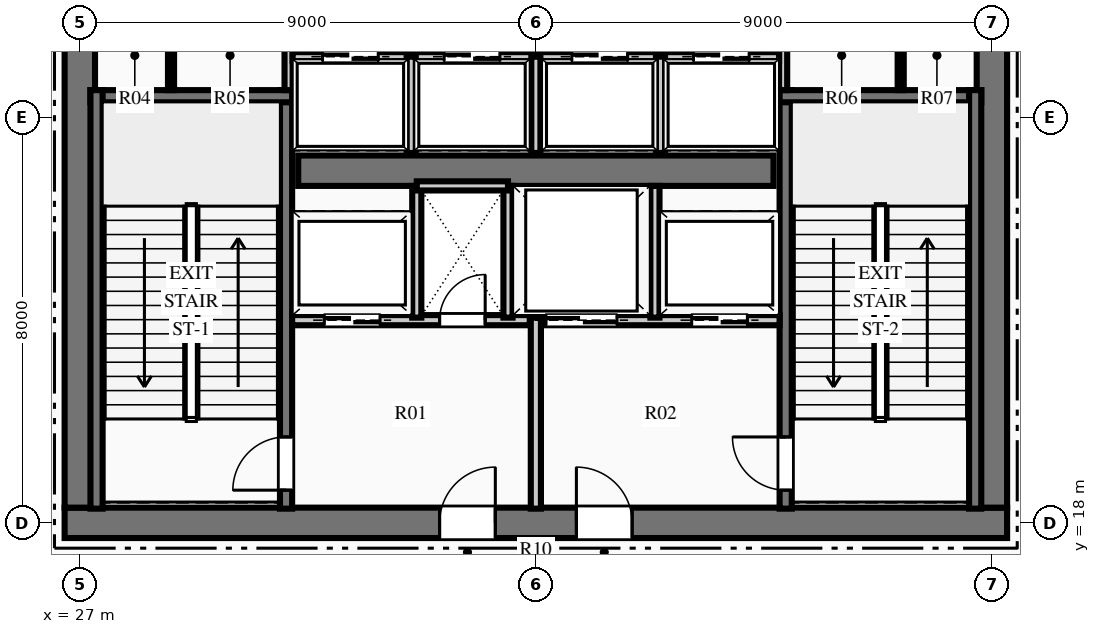
"""IFC4 building model, lengths in metres.
Left out: names, types, materials, properties, quantities, classifications, styles, units other than length and angle.
Written with IfcOpenShell. Run it as: python <this file> out.ifc"""

import sys

from ifc_helpers import new_model, si_unit, direction, frame, frame_2d, origin, place, context, subcontext, project, spatial, rectangle, extrude, element, fill, save


model = new_model("IFC4")
c1 = context("Model", 3, precision=1e-05, world=origin(), true_north=direction((0.0, 1.0)))
c2 = subcontext(c1, "Body", "Model", "MODEL_VIEW")
j1 = project(units=[si_unit("LENGTHUNIT", "METRE"), si_unit("PLANEANGLEUNIT", "RADIAN")], contexts=[c1])
p1 = place(None, origin())
s1 = spatial("IfcSite", under=j1, at=p1, CompositionType="ELEMENT")
p2 = place(p1, origin())
s2 = spatial("IfcBuilding", under=s1, at=p2, CompositionType="ELEMENT")
p3 = place(p2, frame((0.0, 0.0, 6.0)))
s3 = spatial("IfcBuildingStorey", under=s2, at=p3, CompositionType="ELEMENT", Elevation=6.0)
p4 = place(p3, frame((26.7, 18.0, 0.0), z_axis=(0.0, 0.0, 1.0), x_axis=(1.0, 0.0, 0.0)))
e1 = element("IfcWall", 1, at=p4, inside=s3, PredefinedType="SHEAR", context=c2, shape_type="SweptSolid", body=[
    extrude(rectangle(XDim=18.6, YDim=0.6, at=frame_2d((9.3, 0.0))), origin(), (0.0, 0.0, 1.0), 5.4),
])
p5 = place(p4, frame((7.4, 0.0, 0.0)))
e2 = element("IfcOpeningElement", 2, at=p5, cuts=e1, PredefinedType="OPENING", context=c2, shape_type="SweptSolid", body=[
    extrude(rectangle(XDim=1.1, YDim=2.15, at=frame_2d((0.55, 1.075))), frame((0.0, 0.31, 0.0), z_axis=(0.0, -1.0, 0.0), x_axis=(1.0, 0.0, 0.0)), (0.0, 0.0, 1.0), 0.62),
])
p6 = place(p4, frame((10.1, 0.0, 0.0)))
e3 = element("IfcOpeningElement", 3, at=p6, cuts=e1, PredefinedType="OPENING", context=c2, shape_type="SweptSolid", body=[
    extrude(rectangle(XDim=1.1, YDim=2.15, at=frame_2d((0.55, 1.075))), frame((0.0, 0.31, 0.0), z_axis=(0.0, -1.0, 0.0), x_axis=(1.0, 0.0, 0.0)), (0.0, 0.0, 1.0), 0.62),
])
p7 = place(p3, frame((27.0, 18.3, 0.0), z_axis=(0.0, 0.0, 1.0), x_axis=(0.0, 1.0, 0.0)))
e4 = element("IfcWall", 4, at=p7, inside=s3, PredefinedType="SHEAR", context=c2, shape_type="SweptSolid", body=[
    extrude(rectangle(XDim=15.4, YDim=0.6, at=frame_2d((7.7, 0.0))), origin(), (0.0, 0.0, 1.0), 5.4),
])
p8 = place(p7, frame((9.94, 0.0, 0.0)))
e5 = element("IfcOpeningElement", 5, at=p8, cuts=e4, PredefinedType="OPENING", context=c2, shape_type="SweptSolid", body=[
    extrude(rectangle(XDim=1.4, YDim=2.2, at=frame_2d((0.7, 1.1))), frame((0.0, 0.31, 0.0), z_axis=(0.0, -1.0, 0.0), x_axis=(1.0, 0.0, 0.0)), (0.0, 0.0, 1.0), 0.62),
])
p9 = place(p3, frame((45.0, 18.3, 0.0), z_axis=(0.0, 0.0, 1.0), x_axis=(0.0, 1.0, 0.0)))
e6 = element("IfcWall", 6, at=p9, inside=s3, PredefinedType="SHEAR", context=c2, shape_type="SweptSolid", body=[
    extrude(rectangle(XDim=15.4, YDim=0.6, at=frame_2d((7.7, 0.0))), origin(), (0.0, 0.0, 1.0), 5.4),
])
p10 = place(p9, frame((9.94, 0.0, 0.0)))
e7 = element("IfcOpeningElement", 7, at=p10, cuts=e6, PredefinedType="OPENING", context=c2, shape_type="SweptSolid", body=[
    extrude(rectangle(XDim=1.4, YDim=2.2, at=frame_2d((0.7, 1.1))), frame((0.0, 0.31, 0.0), z_axis=(0.0, -1.0, 0.0), x_axis=(1.0, 0.0, 0.0)), (0.0, 0.0, 1.0), 0.62),
])
p11 = place(p3, frame((31.31, 24.95, 0.0), z_axis=(0.0, 0.0, 1.0), x_axis=(1.0, 0.0, 0.0)))
e8 = element("IfcWall", 8, at=p11, inside=s3, PredefinedType="SHEAR", context=c2, shape_type="SweptSolid", body=[
    extrude(rectangle(XDim=9.38, YDim=0.6, at=frame_2d((4.69, 0.0))), origin(), (0.0, 0.0, 1.0), 5.4),
])
p12 = place(p3, frame((31.07, 18.28, 0.0), z_axis=(0.0, 0.0, 1.0), x_axis=(0.0, 1.0, 0.0)))
e9 = element("IfcWall", 9, at=p12, inside=s3, PredefinedType="SHEAR", context=c2, shape_type="SweptSolid", body=[
    extrude(rectangle(XDim=8.26, YDim=0.24, at=frame_2d((4.13, 0.0))), origin(), (0.0, 0.0, 1.0), 5.4),
])
p13 = place(p12, frame((0.365, 0.0, 0.0)))
e10 = element("IfcOpeningElement", 10, at=p13, cuts=e9, PredefinedType="OPENING", context=c2, shape_type="SweptSolid", body=[
    extrude(rectangle(XDim=1.05, YDim=2.15, at=frame_2d((0.525, 1.075))), frame((0.0, 0.13, 0.0), z_axis=(0.0, -1.0, 0.0), x_axis=(1.0, 0.0, 0.0)), (0.0, 0.0, 1.0), 0.26),
])
p14 = place(p3, frame((27.21, 26.42, 0.0), z_axis=(0.0, 0.0, 1.0), x_axis=(1.0, 0.0, 0.0)))
e11 = element("IfcWall", 11, at=p14, inside=s3, PredefinedType="SHEAR", context=c2, shape_type="SweptSolid", body=[
    extrude(rectangle(XDim=3.98, YDim=0.24, at=frame_2d((1.99, 0.0))), origin(), (0.0, 0.0, 1.0), 5.4),
])
p15 = place(p3, frame((27.33, 18.28, 0.0), z_axis=(0.0, 0.0, 1.0), x_axis=(0.0, 1.0, 0.0)))
e12 = element("IfcWall", 12, at=p15, inside=s3, PredefinedType="SHEAR", context=c2, shape_type="SweptSolid", body=[
    extrude(rectangle(XDim=8.26, YDim=0.24, at=frame_2d((4.13, 0.0))), origin(), (0.0, 0.0, 1.0), 5.4),
])
p16 = place(p3, frame((40.93, 18.28, 0.0), z_axis=(0.0, 0.0, 1.0), x_axis=(0.0, 1.0, 0.0)))
e13 = element("IfcWall", 13, at=p16, inside=s3, PredefinedType="SHEAR", context=c2, shape_type="SweptSolid", body=[
    extrude(rectangle(XDim=8.26, YDim=0.24, at=frame_2d((4.13, 0.0))), origin(), (0.0, 0.0, 1.0), 5.4),
])
p17 = place(p16, frame((0.365, 0.0, 0.0)))
e14 = element("IfcOpeningElement", 14, at=p17, cuts=e13, PredefinedType="OPENING", context=c2, shape_type="SweptSolid", body=[
    extrude(rectangle(XDim=1.05, YDim=2.15, at=frame_2d((0.525, 1.075))), frame((0.0, 0.13, 0.0), z_axis=(0.0, -1.0, 0.0), x_axis=(1.0, 0.0, 0.0)), (0.0, 0.0, 1.0), 0.26),
])
p18 = place(p3, frame((40.81, 26.42, 0.0), z_axis=(0.0, 0.0, 1.0), x_axis=(1.0, 0.0, 0.0)))
e15 = element("IfcWall", 15, at=p18, inside=s3, PredefinedType="SHEAR", context=c2, shape_type="SweptSolid", body=[
    extrude(rectangle(XDim=3.98, YDim=0.24, at=frame_2d((1.99, 0.0))), origin(), (0.0, 0.0, 1.0), 5.4),
])
p19 = place(p3, frame((44.67, 18.28, 0.0), z_axis=(0.0, 0.0, 1.0), x_axis=(0.0, 1.0, 0.0)))
e16 = element("IfcWall", 16, at=p19, inside=s3, PredefinedType="SHEAR", context=c2, shape_type="SweptSolid", body=[
    extrude(rectangle(XDim=8.26, YDim=0.24, at=frame_2d((4.13, 0.0))), origin(), (0.0, 0.0, 1.0), 5.4),
])
p20 = place(p3, frame((36.0, 18.28, 0.0), z_axis=(0.0, 0.0, 1.0), x_axis=(0.0, 1.0, 0.0)))
e17 = element("IfcWall", 17, at=p20, inside=s3, PredefinedType="PARTITIONING", context=c2, shape_type="SweptSolid", body=[
    extrude(rectangle(XDim=3.77, YDim=0.2, at=frame_2d((1.885, 0.0))), origin(), (0.0, 0.0, 1.0), 5.07),
])
p21 = place(p3, frame((31.19, 22.0, 0.0), z_axis=(0.0, 0.0, 1.0), x_axis=(1.0, 0.0, 0.0)))
e18 = element("IfcWall", 18, at=p21, inside=s3, PredefinedType="PARTITIONING", context=c2, shape_type="SweptSolid", body=[
    extrude(rectangle(XDim=4.69, YDim=0.2, at=frame_2d((2.345, 0.0))), origin(), (0.0, 0.0, 1.0), 5.07),
])
p22 = place(p21, frame((2.91, 0.0, 0.0)))
e19 = element("IfcOpeningElement", 19, at=p22, cuts=e18, PredefinedType="OPENING", context=c2, shape_type="SweptSolid", body=[
    extrude(rectangle(XDim=0.9, YDim=2.15, at=frame_2d((0.45, 1.075))), frame((0.0, 0.11, 0.0), z_axis=(0.0, -1.0, 0.0), x_axis=(1.0, 0.0, 0.0)), (0.0, 0.0, 1.0), 0.22),
])
p23 = place(p21, frame((0.635, 0.0, 0.0)))
e20 = element("IfcOpeningElement", 20, at=p23, cuts=e18, PredefinedType="OPENING", context=c2, shape_type="SweptSolid", body=[
    extrude(rectangle(XDim=1.1, YDim=2.15, at=frame_2d((0.55, 1.075))), frame((0.0, 0.11, 0.0), z_axis=(0.0, -1.0, 0.0), x_axis=(1.0, 0.0, 0.0)), (0.0, 0.0, 1.0), 0.22),
])
p24 = place(p3, frame((36.12, 22.0, 0.0), z_axis=(0.0, 0.0, 1.0), x_axis=(1.0, 0.0, 0.0)))
e21 = element("IfcWall", 21, at=p24, inside=s3, PredefinedType="PARTITIONING", context=c2, shape_type="SweptSolid", body=[
    extrude(rectangle(XDim=4.69, YDim=0.2, at=frame_2d((2.345, 0.0))), origin(), (0.0, 0.0, 1.0), 5.07),
])
p25 = place(p24, frame((2.955, 0.0, 0.0)))
e22 = element("IfcOpeningElement", 22, at=p25, cuts=e21, PredefinedType="OPENING", context=c2, shape_type="SweptSolid", body=[
    extrude(rectangle(XDim=1.1, YDim=2.15, at=frame_2d((0.55, 1.075))), frame((0.0, 0.11, 0.0), z_axis=(0.0, -1.0, 0.0), x_axis=(1.0, 0.0, 0.0)), (0.0, 0.0, 1.0), 0.22),
])
p26 = place(p24, frame((0.08, 0.0, 0.0)))
e23 = element("IfcOpeningElement", 23, at=p26, cuts=e21, PredefinedType="OPENING", context=c2, shape_type="SweptSolid", body=[
    extrude(rectangle(XDim=1.4, YDim=2.2, at=frame_2d((0.7, 1.1))), frame((0.0, 0.11, 0.0), z_axis=(0.0, -1.0, 0.0), x_axis=(1.0, 0.0, 0.0)), (0.0, 0.0, 1.0), 0.22),
])
for number, where, z_axis, x_axis in (
    (24, (33.65, 22.05, 0.0), (0.0, 0.0, 1.0), (0.0, 1.0, 0.0)),
    (25, (35.45, 22.05, 0.0), (0.0, 0.0, 1.0), (0.0, 1.0, 0.0)),
):
    element("IfcWall", number, at=place(p3, frame(where, z_axis=z_axis, x_axis=x_axis)), inside=s3, PredefinedType="PARTITIONING", context=c2, shape_type="SweptSolid", body=[
        extrude(rectangle(XDim=2.6, YDim=0.18, at=frame_2d((1.3, 0.0))), origin(), (0.0, 0.0, 1.0), 5.07),
    ])
p27 = place(p3, frame((33.65, 24.65, 0.0), z_axis=(0.0, 0.0, 1.0), x_axis=(1.0, 0.0, 0.0)))
e26 = element("IfcWall", 26, at=p27, inside=s3, PredefinedType="PARTITIONING", context=c2, shape_type="SweptSolid", body=[
    extrude(rectangle(XDim=1.8, YDim=0.18, at=frame_2d((0.9, 0.0))), origin(), (0.0, 0.0, 1.0), 5.07),
])
p28 = place(p3, frame((38.35, 22.05, 0.0), z_axis=(0.0, 0.0, 1.0), x_axis=(0.0, 1.0, 0.0)))
e27 = element("IfcWall", 27, at=p28, inside=s3, PredefinedType="PARTITIONING", context=c2, shape_type="SweptSolid", body=[
    extrude(rectangle(XDim=2.6, YDim=0.18, at=frame_2d((1.3, 0.0))), origin(), (0.0, 0.0, 1.0), 5.07),
])
for number, where, z_axis, x_axis in (
    (28, (31.12, 26.54, 0.0), (0.0, 0.0, 1.0), (0.0, 1.0, 0.0)),
    (29, (40.88, 26.54, 0.0), (0.0, 0.0, 1.0), (0.0, 1.0, 0.0)),
):
    element("IfcWall", number, at=place(p3, frame(where, z_axis=z_axis, x_axis=x_axis)), inside=s3, PredefinedType="PARTITIONING", context=c2, shape_type="SweptSolid", body=[
        extrude(rectangle(XDim=1.51, YDim=0.16, at=frame_2d((0.755, 0.0))), origin(), (0.0, 0.0, 1.0), 5.07),
    ])
for number, where, z_axis, x_axis in (
    (30, (28.8, 26.54, 0.0), (0.0, 0.0, 1.0), (0.0, 1.0, 0.0)),
    (31, (43.2, 26.54, 0.0), (0.0, 0.0, 1.0), (0.0, 1.0, 0.0)),
):
    element("IfcWall", number, at=place(p3, frame(where, z_axis=z_axis, x_axis=x_axis)), inside=s3, PredefinedType="PARTITIONING", context=c2, shape_type="SweptSolid", body=[
        extrude(rectangle(XDim=1.44, YDim=0.12, at=frame_2d((0.72, 0.0))), origin(), (0.0, 0.0, 1.0), 5.07),
    ])
p29 = place(p3, frame((31.2, 27.2, 0.0), z_axis=(0.0, 0.0, 1.0), x_axis=(1.0, 0.0, 0.0)))
e32 = element("IfcWall", 32, at=p29, inside=s3, PredefinedType="PARTITIONING", context=c2, shape_type="SweptSolid", body=[
    extrude(rectangle(XDim=9.6, YDim=0.18, at=frame_2d((4.8, 0.0))), origin(), (0.0, 0.0, 1.0), 5.07),
])
p30 = place(p29, frame((0.59, 0.0, 0.0)))
e33 = element("IfcOpeningElement", 33, at=p30, cuts=e32, PredefinedType="OPENING", context=c2, shape_type="SweptSolid", body=[
    extrude(rectangle(XDim=1.1, YDim=2.15, at=frame_2d((0.55, 1.075))), frame((0.0, 0.1, 0.0), z_axis=(0.0, -1.0, 0.0), x_axis=(1.0, 0.0, 0.0)), (0.0, 0.0, 1.0), 0.2),
])
p31 = place(p29, frame((2.99, 0.0, 0.0)))
e34 = element("IfcOpeningElement", 34, at=p31, cuts=e32, PredefinedType="OPENING", context=c2, shape_type="SweptSolid", body=[
    extrude(rectangle(XDim=1.1, YDim=2.15, at=frame_2d((0.55, 1.075))), frame((0.0, 0.1, 0.0), z_axis=(0.0, -1.0, 0.0), x_axis=(1.0, 0.0, 0.0)), (0.0, 0.0, 1.0), 0.2),
])
p32 = place(p29, frame((5.51, 0.0, 0.0)))
e35 = element("IfcOpeningElement", 35, at=p32, cuts=e32, PredefinedType="OPENING", context=c2, shape_type="SweptSolid", body=[
    extrude(rectangle(XDim=1.1, YDim=2.15, at=frame_2d((0.55, 1.075))), frame((0.0, 0.1, 0.0), z_axis=(0.0, -1.0, 0.0), x_axis=(1.0, 0.0, 0.0)), (0.0, 0.0, 1.0), 0.2),
])
p33 = place(p29, frame((7.91, 0.0, 0.0)))
e36 = element("IfcOpeningElement", 36, at=p33, cuts=e32, PredefinedType="OPENING", context=c2, shape_type="SweptSolid", body=[
    extrude(rectangle(XDim=1.1, YDim=2.15, at=frame_2d((0.55, 1.075))), frame((0.0, 0.1, 0.0), z_axis=(0.0, -1.0, 0.0), x_axis=(1.0, 0.0, 0.0)), (0.0, 0.0, 1.0), 0.2),
])
for number, where, z_axis, x_axis in (
    (37, (33.54, 25.3, 0.0), (0.0, 0.0, 1.0), (0.0, 1.0, 0.0)),
    (38, (36.0, 25.3, 0.0), (0.0, 0.0, 1.0), (0.0, 1.0, 0.0)),
    (39, (38.46, 25.3, 0.0), (0.0, 0.0, 1.0), (0.0, 1.0, 0.0)),
):
    element("IfcWall", number, at=place(p3, frame(where, z_axis=z_axis, x_axis=x_axis)), inside=s3, PredefinedType="PARTITIONING", context=c2, shape_type="SweptSolid", body=[
        extrude(rectangle(XDim=1.9, YDim=0.18, at=frame_2d((0.95, 0.0))), origin(), (0.0, 0.0, 1.0), 5.07),
    ])
p34 = place(p13, origin())
e40 = element("IfcDoor", 40, at=p34, inside=s3, OperationType="SINGLE_SWING_LEFT", PredefinedType="DOOR", context=c2, shape_type="SweptSolid", body=[
    extrude(rectangle(XDim=1.05, YDim=2.15, at=frame_2d((0.525, 1.075))), frame((0.0, 0.025, 0.0), z_axis=(0.0, -1.0, 0.0), x_axis=(1.0, 0.0, 0.0)), (0.0, 0.0, 1.0), 0.05),
])
fill(e10, e40)
p35 = place(p17, origin())
e41 = element("IfcDoor", 41, at=p35, inside=s3, OperationType="SINGLE_SWING_RIGHT", PredefinedType="DOOR", context=c2, shape_type="SweptSolid", body=[
    extrude(rectangle(XDim=1.05, YDim=2.15, at=frame_2d((0.525, 1.075))), frame((0.0, 0.025, 0.0), z_axis=(0.0, -1.0, 0.0), x_axis=(1.0, 0.0, 0.0)), (0.0, 0.0, 1.0), 0.05),
])
fill(e14, e41)
p36 = place(p5, origin())
e42 = element("IfcDoor", 42, at=p36, inside=s3, OperationType="SINGLE_SWING_RIGHT", PredefinedType="DOOR", context=c2, shape_type="SweptSolid", body=[
    extrude(rectangle(XDim=1.1, YDim=2.15, at=frame_2d((0.55, 1.075))), frame((0.0, 0.025, 0.0), z_axis=(0.0, -1.0, 0.0), x_axis=(1.0, 0.0, 0.0)), (0.0, 0.0, 1.0), 0.05),
])
fill(e2, e42)
p37 = place(p6, origin())
e43 = element("IfcDoor", 43, at=p37, inside=s3, OperationType="SINGLE_SWING_LEFT", PredefinedType="DOOR", context=c2, shape_type="SweptSolid", body=[
    extrude(rectangle(XDim=1.1, YDim=2.15, at=frame_2d((0.55, 1.075))), frame((0.0, 0.025, 0.0), z_axis=(0.0, -1.0, 0.0), x_axis=(1.0, 0.0, 0.0)), (0.0, 0.0, 1.0), 0.05),
])
fill(e3, e43)
p38 = place(p22, origin())
e44 = element("IfcDoor", 44, at=p38, inside=s3, OperationType="SINGLE_SWING_RIGHT", PredefinedType="DOOR", context=c2, shape_type="SweptSolid", body=[
    extrude(rectangle(XDim=0.9, YDim=2.15, at=frame_2d((0.45, 1.075))), frame((0.0, 0.025, 0.0), z_axis=(0.0, -1.0, 0.0), x_axis=(1.0, 0.0, 0.0)), (0.0, 0.0, 1.0), 0.05),
])
fill(e19, e44)
p39 = place(p30, origin())
e45 = element("IfcDoor", 45, at=p39, inside=s3, OperationType="SLIDING_TO_LEFT", PredefinedType="DOOR", context=c2, shape_type="SweptSolid", body=[
    extrude(rectangle(XDim=1.1, YDim=2.15, at=frame_2d((0.55, 1.075))), frame((0.0, 0.025, 0.0), z_axis=(0.0, -1.0, 0.0), x_axis=(1.0, 0.0, 0.0)), (0.0, 0.0, 1.0), 0.05),
])
fill(e33, e45)
p40 = place(p31, origin())
e46 = element("IfcDoor", 46, at=p40, inside=s3, OperationType="SLIDING_TO_LEFT", PredefinedType="DOOR", context=c2, shape_type="SweptSolid", body=[
    extrude(rectangle(XDim=1.1, YDim=2.15, at=frame_2d((0.55, 1.075))), frame((0.0, 0.025, 0.0), z_axis=(0.0, -1.0, 0.0), x_axis=(1.0, 0.0, 0.0)), (0.0, 0.0, 1.0), 0.05),
])
fill(e34, e46)
p41 = place(p32, origin())
e47 = element("IfcDoor", 47, at=p41, inside=s3, OperationType="SLIDING_TO_LEFT", PredefinedType="DOOR", context=c2, shape_type="SweptSolid", body=[
    extrude(rectangle(XDim=1.1, YDim=2.15, at=frame_2d((0.55, 1.075))), frame((0.0, 0.025, 0.0), z_axis=(0.0, -1.0, 0.0), x_axis=(1.0, 0.0, 0.0)), (0.0, 0.0, 1.0), 0.05),
])
fill(e35, e47)
p42 = place(p33, origin())
e48 = element("IfcDoor", 48, at=p42, inside=s3, OperationType="SLIDING_TO_LEFT", PredefinedType="DOOR", context=c2, shape_type="SweptSolid", body=[
    extrude(rectangle(XDim=1.1, YDim=2.15, at=frame_2d((0.55, 1.075))), frame((0.0, 0.025, 0.0), z_axis=(0.0, -1.0, 0.0), x_axis=(1.0, 0.0, 0.0)), (0.0, 0.0, 1.0), 0.05),
])
fill(e36, e48)
p43 = place(p23, origin())
e49 = element("IfcDoor", 49, at=p43, inside=s3, OperationType="SLIDING_TO_LEFT", PredefinedType="DOOR", context=c2, shape_type="SweptSolid", body=[
    extrude(rectangle(XDim=1.1, YDim=2.15, at=frame_2d((0.55, 1.075))), frame((0.0, 0.025, 0.0), z_axis=(0.0, -1.0, 0.0), x_axis=(1.0, 0.0, 0.0)), (0.0, 0.0, 1.0), 0.05),
])
fill(e20, e49)
p44 = place(p25, origin())
e50 = element("IfcDoor", 50, at=p44, inside=s3, OperationType="SLIDING_TO_LEFT", PredefinedType="DOOR", context=c2, shape_type="SweptSolid", body=[
    extrude(rectangle(XDim=1.1, YDim=2.15, at=frame_2d((0.55, 1.075))), frame((0.0, 0.025, 0.0), z_axis=(0.0, -1.0, 0.0), x_axis=(1.0, 0.0, 0.0)), (0.0, 0.0, 1.0), 0.05),
])
fill(e22, e50)
p45 = place(p26, origin())
e51 = element("IfcDoor", 51, at=p45, inside=s3, OperationType="SLIDING_TO_LEFT", PredefinedType="DOOR", context=c2, shape_type="SweptSolid", body=[
    extrude(rectangle(XDim=1.4, YDim=2.2, at=frame_2d((0.7, 1.1))), frame((0.0, 0.025, 0.0), z_axis=(0.0, -1.0, 0.0), x_axis=(1.0, 0.0, 0.0)), (0.0, 0.0, 1.0), 0.05),
])
fill(e23, e51)
save(model, sys.argv[1])
